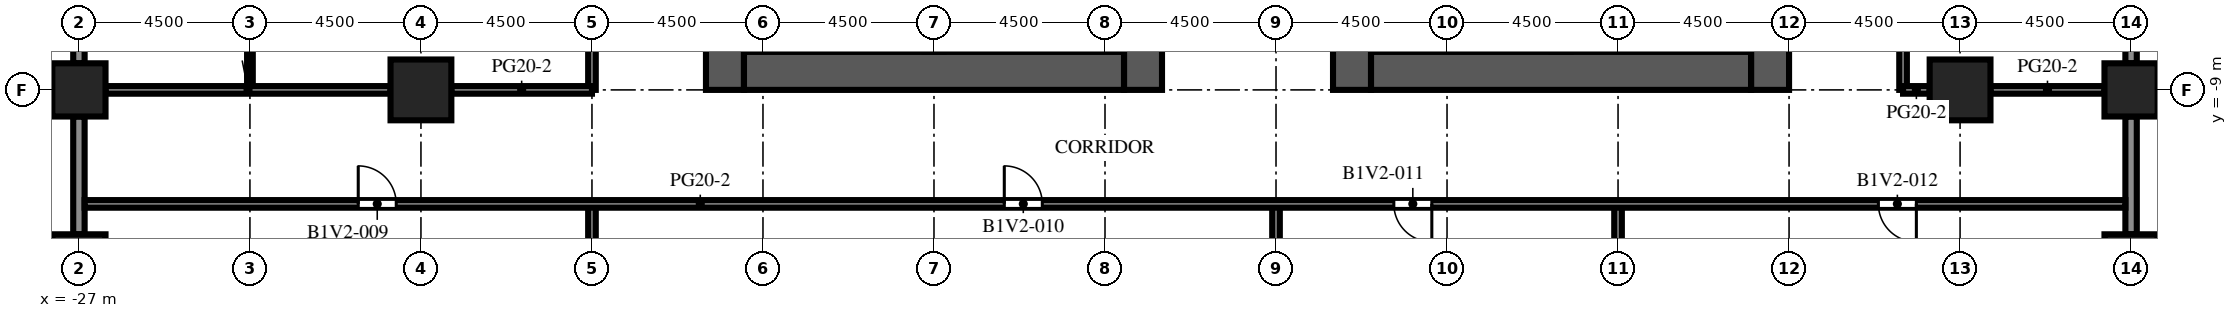
"""IFC4 building model, lengths in metres.
Left out: names, types, materials, properties, quantities, classifications, styles, units other than length and angle.
Written with IfcOpenShell. Run it as: python <this file> out.ifc"""

import sys

from ifc_helpers import new_model, si_unit, direction, frame, frame_2d, origin, origin_2d, place, context, subcontext, project, spatial, rectangle, extrude, element, fill, save


model = new_model("IFC4")
c1 = context("Model", 3, precision=1e-05, world=origin(), true_north=direction((0.0, 1.0)))
c2 = subcontext(c1, "Body", "Model", "MODEL_VIEW")
j1 = project(units=[si_unit("LENGTHUNIT", "METRE"), si_unit("PLANEANGLEUNIT", "RADIAN")], contexts=[c1])
p1 = place(None, origin())
s1 = spatial("IfcSite", under=j1, at=p1, CompositionType="ELEMENT")
p2 = place(p1, origin())
s2 = spatial("IfcBuilding", under=s1, at=p2, CompositionType="ELEMENT")
p3 = place(p2, frame((0.0, 0.0, 31.8)))
s3 = spatial("IfcBuildingStorey", under=s2, at=p3, CompositionType="ELEMENT", Elevation=31.8)
for number, where, z_axis, x_axis in (
    (1, (-27.0, -13.5, 0.0), (0.0, 0.0, 1.0), (1.0, 0.0, 0.0)),
    (2, (-27.0, -9.0, 0.0), (0.0, 0.0, 1.0), (1.0, 0.0, 0.0)),
    (3, (27.0, -13.5, 0.0), (0.0, 0.0, 1.0), (1.0, 0.0, 0.0)),
    (4, (27.0, -9.0, 0.0), (0.0, 0.0, 1.0), (1.0, 0.0, 0.0)),
):
    element("IfcColumn", number, at=place(p3, frame(where, z_axis=z_axis, x_axis=x_axis)), inside=s3, PredefinedType="COLUMN", context=c2, shape_type="SweptSolid", body=[
        extrude(rectangle(XDim=1.4, YDim=1.4, at=origin_2d()), origin(), (0.0, 0.0, 1.0), 4.1),
    ])
for number, where, z_axis, x_axis in (
    (5, (-18.0, -9.0, 0.0), (0.0, 0.0, 1.0), (1.0, 0.0, 0.0)),
    (6, (22.5, -9.0, 0.0), (0.0, 0.0, 1.0), (1.0, 0.0, 0.0)),
):
    element("IfcColumn", number, at=place(p3, frame(where, z_axis=z_axis, x_axis=x_axis)), inside=s3, PredefinedType="COLUMN", context=c2, shape_type="SweptSolid", body=[
        extrude(rectangle(XDim=1.6, YDim=1.6, at=origin_2d()), origin(), (0.0, 0.0, 1.0), 4.1),
    ])
p4 = place(p3, frame((-10.0, -9.0, 0.0), z_axis=(0.0, 0.0, 1.0), x_axis=(0.0, 1.0, 0.0)))
e7 = element("IfcWall", 7, at=p4, inside=s3, PredefinedType="SHEAR", context=c2, shape_type="SweptSolid", body=[
    extrude(rectangle(XDim=27.5, YDim=1.0, at=frame_2d((13.75, 0.0))), origin(), (0.0, 0.0, 1.0), 4.1),
])
p5 = place(p4, frame((12.55, 0.0, 0.0)))
e8 = element("IfcOpeningElement", 8, at=p5, cuts=e7, PredefinedType="OPENING", context=c2, shape_type="SweptSolid", body=[
    extrude(rectangle(XDim=2.4, YDim=2.4, at=frame_2d((1.2, 1.2))), frame((0.0, 0.51, 0.0), z_axis=(0.0, -1.0, 0.0), x_axis=(1.0, 0.0, 0.0)), (0.0, 0.0, 1.0), 1.02),
])
p6 = place(p4, frame((6.825, 0.0, 0.0)))
e9 = element("IfcOpeningElement", 9, at=p6, cuts=e7, PredefinedType="OPENING", context=c2, shape_type="SweptSolid", body=[
    extrude(rectangle(XDim=1.2, YDim=2.1, at=frame_2d((0.6, 1.05))), frame((0.0, 0.51, 0.0), z_axis=(0.0, -1.0, 0.0), x_axis=(1.0, 0.0, 0.0)), (0.0, 0.0, 1.0), 1.02),
])
p7 = place(p4, frame((19.475, 0.0, 0.0)))
e10 = element("IfcOpeningElement", 10, at=p7, cuts=e7, PredefinedType="OPENING", context=c2, shape_type="SweptSolid", body=[
    extrude(rectangle(XDim=1.2, YDim=2.1, at=frame_2d((0.6, 1.05))), frame((0.0, 0.51, 0.0), z_axis=(0.0, -1.0, 0.0), x_axis=(1.0, 0.0, 0.0)), (0.0, 0.0, 1.0), 1.02),
])
p8 = place(p3, frame((1.0, -9.0, 0.0), z_axis=(0.0, 0.0, 1.0), x_axis=(0.0, 1.0, 0.0)))
e11 = element("IfcWall", 11, at=p8, inside=s3, PredefinedType="SHEAR", context=c2, shape_type="SweptSolid", body=[
    extrude(rectangle(XDim=27.5, YDim=1.0, at=frame_2d((13.75, 0.0))), origin(), (0.0, 0.0, 1.0), 4.1),
])
p9 = place(p8, frame((12.55, 0.0, 0.0)))
e12 = element("IfcOpeningElement", 12, at=p9, cuts=e11, PredefinedType="OPENING", context=c2, shape_type="SweptSolid", body=[
    extrude(rectangle(XDim=2.4, YDim=2.4, at=frame_2d((1.2, 1.2))), frame((0.0, 0.51, 0.0), z_axis=(0.0, -1.0, 0.0), x_axis=(1.0, 0.0, 0.0)), (0.0, 0.0, 1.0), 1.02),
])
p10 = place(p8, frame((4.025, 0.0, 0.0)))
e13 = element("IfcOpeningElement", 13, at=p10, cuts=e11, PredefinedType="OPENING", context=c2, shape_type="SweptSolid", body=[
    extrude(rectangle(XDim=1.2, YDim=2.1, at=frame_2d((0.6, 1.05))), frame((0.0, 0.51, 0.0), z_axis=(0.0, -1.0, 0.0), x_axis=(1.0, 0.0, 0.0)), (0.0, 0.0, 1.0), 1.02),
])
p11 = place(p8, frame((19.475, 0.0, 0.0)))
e14 = element("IfcOpeningElement", 14, at=p11, cuts=e11, PredefinedType="OPENING", context=c2, shape_type="SweptSolid", body=[
    extrude(rectangle(XDim=1.0, YDim=2.1, at=frame_2d((0.5, 1.05))), frame((0.0, 0.51, 0.0), z_axis=(0.0, -1.0, 0.0), x_axis=(1.0, 0.0, 0.0)), (0.0, 0.0, 1.0), 1.02),
])
p12 = place(p8, frame((21.106, 0.0, 0.0)))
e15 = element("IfcOpeningElement", 15, at=p12, cuts=e11, PredefinedType="OPENING", context=c2, shape_type="SweptSolid", body=[
    extrude(rectangle(XDim=1.0, YDim=2.1, at=frame_2d((0.5, 1.05))), frame((0.0, 0.51, 0.0), z_axis=(0.0, -1.0, 0.0), x_axis=(1.0, 0.0, 0.0)), (0.0, 0.0, 1.0), 1.02),
])
p13 = place(p8, frame((23.1, 0.0, 0.0)))
e16 = element("IfcOpeningElement", 16, at=p13, cuts=e11, PredefinedType="OPENING", context=c2, shape_type="SweptSolid", body=[
    extrude(rectangle(XDim=1.0, YDim=2.1, at=frame_2d((0.5, 1.05))), frame((0.0, 0.51, 0.0), z_axis=(0.0, -1.0, 0.0), x_axis=(1.0, 0.0, 0.0)), (0.0, 0.0, 1.0), 1.02),
])
p14 = place(p8, frame((25.094, 0.0, 0.0)))
e17 = element("IfcOpeningElement", 17, at=p14, cuts=e11, PredefinedType="OPENING", context=c2, shape_type="SweptSolid", body=[
    extrude(rectangle(XDim=1.0, YDim=2.1, at=frame_2d((0.5, 1.05))), frame((0.0, 0.51, 0.0), z_axis=(0.0, -1.0, 0.0), x_axis=(1.0, 0.0, 0.0)), (0.0, 0.0, 1.0), 1.02),
])
p15 = place(p3, frame((-9.5, -8.5, 0.0), z_axis=(0.0, 0.0, 1.0), x_axis=(1.0, 0.0, 0.0)))
e18 = element("IfcWall", 18, at=p15, inside=s3, PredefinedType="SHEAR", context=c2, shape_type="SweptSolid", body=[
    extrude(rectangle(XDim=10.0, YDim=1.0, at=frame_2d((5.0, 0.0))), origin(), (0.0, 0.0, 1.0), 4.1),
])
p16 = place(p3, frame((6.5, -9.0, 0.0), z_axis=(0.0, 0.0, 1.0), x_axis=(0.0, 1.0, 0.0)))
e19 = element("IfcWall", 19, at=p16, inside=s3, PredefinedType="SHEAR", context=c2, shape_type="SweptSolid", body=[
    extrude(rectangle(XDim=27.5, YDim=1.0, at=frame_2d((13.75, 0.0))), origin(), (0.0, 0.0, 1.0), 4.1),
])
p17 = place(p16, frame((12.55, 0.0, 0.0)))
e20 = element("IfcOpeningElement", 20, at=p17, cuts=e19, PredefinedType="OPENING", context=c2, shape_type="SweptSolid", body=[
    extrude(rectangle(XDim=2.4, YDim=2.4, at=frame_2d((1.2, 1.2))), frame((0.0, 0.51, 0.0), z_axis=(0.0, -1.0, 0.0), x_axis=(1.0, 0.0, 0.0)), (0.0, 0.0, 1.0), 1.02),
])
p18 = place(p16, frame((4.025, 0.0, 0.0)))
e21 = element("IfcOpeningElement", 21, at=p18, cuts=e19, PredefinedType="OPENING", context=c2, shape_type="SweptSolid", body=[
    extrude(rectangle(XDim=1.2, YDim=2.1, at=frame_2d((0.6, 1.05))), frame((0.0, 0.51, 0.0), z_axis=(0.0, -1.0, 0.0), x_axis=(1.0, 0.0, 0.0)), (0.0, 0.0, 1.0), 1.02),
])
p19 = place(p16, frame((19.475, 0.0, 0.0)))
e22 = element("IfcOpeningElement", 22, at=p19, cuts=e19, PredefinedType="OPENING", context=c2, shape_type="SweptSolid", body=[
    extrude(rectangle(XDim=1.0, YDim=2.1, at=frame_2d((0.5, 1.05))), frame((0.0, 0.51, 0.0), z_axis=(0.0, -1.0, 0.0), x_axis=(1.0, 0.0, 0.0)), (0.0, 0.0, 1.0), 1.02),
])
p20 = place(p16, frame((21.106, 0.0, 0.0)))
e23 = element("IfcOpeningElement", 23, at=p20, cuts=e19, PredefinedType="OPENING", context=c2, shape_type="SweptSolid", body=[
    extrude(rectangle(XDim=1.0, YDim=2.1, at=frame_2d((0.5, 1.05))), frame((0.0, 0.51, 0.0), z_axis=(0.0, -1.0, 0.0), x_axis=(1.0, 0.0, 0.0)), (0.0, 0.0, 1.0), 1.02),
])
p21 = place(p16, frame((23.1, 0.0, 0.0)))
e24 = element("IfcOpeningElement", 24, at=p21, cuts=e19, PredefinedType="OPENING", context=c2, shape_type="SweptSolid", body=[
    extrude(rectangle(XDim=1.0, YDim=2.1, at=frame_2d((0.5, 1.05))), frame((0.0, 0.51, 0.0), z_axis=(0.0, -1.0, 0.0), x_axis=(1.0, 0.0, 0.0)), (0.0, 0.0, 1.0), 1.02),
])
p22 = place(p16, frame((25.094, 0.0, 0.0)))
e25 = element("IfcOpeningElement", 25, at=p22, cuts=e19, PredefinedType="OPENING", context=c2, shape_type="SweptSolid", body=[
    extrude(rectangle(XDim=1.0, YDim=2.1, at=frame_2d((0.5, 1.05))), frame((0.0, 0.51, 0.0), z_axis=(0.0, -1.0, 0.0), x_axis=(1.0, 0.0, 0.0)), (0.0, 0.0, 1.0), 1.02),
])
p23 = place(p3, frame((17.5, -9.0, 0.0), z_axis=(0.0, 0.0, 1.0), x_axis=(0.0, 1.0, 0.0)))
e26 = element("IfcWall", 26, at=p23, inside=s3, PredefinedType="SHEAR", context=c2, shape_type="SweptSolid", body=[
    extrude(rectangle(XDim=27.5, YDim=1.0, at=frame_2d((13.75, 0.0))), origin(), (0.0, 0.0, 1.0), 4.1),
])
p24 = place(p23, frame((12.55, 0.0, 0.0)))
e27 = element("IfcOpeningElement", 27, at=p24, cuts=e26, PredefinedType="OPENING", context=c2, shape_type="SweptSolid", body=[
    extrude(rectangle(XDim=2.4, YDim=2.4, at=frame_2d((1.2, 1.2))), frame((0.0, 0.51, 0.0), z_axis=(0.0, -1.0, 0.0), x_axis=(1.0, 0.0, 0.0)), (0.0, 0.0, 1.0), 1.02),
])
p25 = place(p23, frame((6.825, 0.0, 0.0)))
e28 = element("IfcOpeningElement", 28, at=p25, cuts=e26, PredefinedType="OPENING", context=c2, shape_type="SweptSolid", body=[
    extrude(rectangle(XDim=1.2, YDim=2.1, at=frame_2d((0.6, 1.05))), frame((0.0, 0.51, 0.0), z_axis=(0.0, -1.0, 0.0), x_axis=(1.0, 0.0, 0.0)), (0.0, 0.0, 1.0), 1.02),
])
p26 = place(p23, frame((19.475, 0.0, 0.0)))
e29 = element("IfcOpeningElement", 29, at=p26, cuts=e26, PredefinedType="OPENING", context=c2, shape_type="SweptSolid", body=[
    extrude(rectangle(XDim=1.2, YDim=2.1, at=frame_2d((0.6, 1.05))), frame((0.0, 0.51, 0.0), z_axis=(0.0, -1.0, 0.0), x_axis=(1.0, 0.0, 0.0)), (0.0, 0.0, 1.0), 1.02),
])
p27 = place(p3, frame((7.0, -8.5, 0.0), z_axis=(0.0, 0.0, 1.0), x_axis=(1.0, 0.0, 0.0)))
e30 = element("IfcWall", 30, at=p27, inside=s3, PredefinedType="SHEAR", context=c2, shape_type="SweptSolid", body=[
    extrude(rectangle(XDim=10.0, YDim=1.0, at=frame_2d((5.0, 0.0))), origin(), (0.0, 0.0, 1.0), 4.1),
])
for number, where, z_axis, x_axis in (
    (31, (27.0, -9.7, 0.0), (0.0, 0.0, 1.0), (0.0, -1.0, 0.0)),
    (32, (27.0, -5.2, 0.0), (0.0, 0.0, 1.0), (0.0, -1.0, 0.0)),
    (33, (-27.0, -8.3, 0.0), (0.0, 0.0, 1.0), (0.0, 1.0, 0.0)),
    (34, (-27.0, -12.8, 0.0), (0.0, 0.0, 1.0), (0.0, 1.0, 0.0)),
):
    element("IfcWall", number, at=place(p3, frame(where, z_axis=z_axis, x_axis=x_axis)), inside=s3, PredefinedType="SOLIDWALL", context=c2, shape_type="SweptSolid", body=[
        extrude(rectangle(XDim=3.1, YDim=0.3, at=frame_2d((1.55, 0.0))), origin(), (0.0, 0.0, 1.0), 2.6),
    ])
p28 = place(p3, frame((-22.5, -9.0, 0.0), z_axis=(0.0, 0.0, 1.0), x_axis=(0.0, 1.0, 0.0)))
e35 = element("IfcWall", 35, at=p28, inside=s3, PredefinedType="PARTITIONING", context=c2, shape_type="SweptSolid", body=[
    extrude(rectangle(XDim=27.5, YDim=0.15, at=frame_2d((13.75, 0.0))), origin(), (0.0, 0.0, 1.0), 3.5),
])
p29 = place(p28, frame((7.85, 0.0, 0.0)))
e36 = element("IfcOpeningElement", 36, at=p29, cuts=e35, PredefinedType="OPENING", context=c2, shape_type="SweptSolid", body=[
    extrude(rectangle(XDim=1.0, YDim=2.1, at=frame_2d((0.5, 1.05))), frame((0.0, 0.085, 0.0), z_axis=(0.0, -1.0, 0.0), x_axis=(1.0, 0.0, 0.0)), (0.0, 0.0, 1.0), 0.17),
])
p30 = place(p28, frame((18.85, 0.0, 0.0)))
e37 = element("IfcOpeningElement", 37, at=p30, cuts=e35, PredefinedType="OPENING", context=c2, shape_type="SweptSolid", body=[
    extrude(rectangle(XDim=1.0, YDim=2.1, at=frame_2d((0.5, 1.05))), frame((0.0, 0.085, 0.0), z_axis=(0.0, -1.0, 0.0), x_axis=(1.0, 0.0, 0.0)), (0.0, 0.0, 1.0), 0.17),
])
p31 = place(p3, frame((-13.5, -26.3, 0.0), z_axis=(0.0, 0.0, 1.0), x_axis=(0.0, 1.0, 0.0)))
e38 = element("IfcWall", 38, at=p31, inside=s3, PredefinedType="PARTITIONING", context=c2, shape_type="SweptSolid", body=[
    extrude(rectangle(XDim=14.3, YDim=0.2, at=frame_2d((7.15, 0.0))), origin(), (0.0, 0.0, 1.0), 3.5),
])
p32 = place(p3, frame((-13.5, -9.0, 0.0), z_axis=(0.0, 0.0, 1.0), x_axis=(0.0, 1.0, 0.0)))
e39 = element("IfcWall", 39, at=p32, inside=s3, PredefinedType="PARTITIONING", context=c2, shape_type="SweptSolid", body=[
    extrude(rectangle(XDim=27.5, YDim=0.2, at=frame_2d((13.75, 0.0))), origin(), (0.0, 0.0, 1.0), 3.5),
])
p33 = place(p32, frame((8.1, 0.0, 0.0)))
e40 = element("IfcOpeningElement", 40, at=p33, cuts=e39, PredefinedType="OPENING", context=c2, shape_type="SweptSolid", body=[
    extrude(rectangle(XDim=1.0, YDim=2.1, at=frame_2d((0.5, 1.05))), frame((0.0, 0.11, 0.0), z_axis=(0.0, -1.0, 0.0), x_axis=(1.0, 0.0, 0.0)), (0.0, 0.0, 1.0), 0.22),
])
p34 = place(p32, frame((20.6, 0.0, 0.0)))
e41 = element("IfcOpeningElement", 41, at=p34, cuts=e39, PredefinedType="OPENING", context=c2, shape_type="SweptSolid", body=[
    extrude(rectangle(XDim=1.0, YDim=2.1, at=frame_2d((0.5, 1.05))), frame((0.0, 0.11, 0.0), z_axis=(0.0, -1.0, 0.0), x_axis=(1.0, 0.0, 0.0)), (0.0, 0.0, 1.0), 0.22),
])
for number, where, z_axis, x_axis in (
    (42, (4.5, -26.3, 0.0), (0.0, 0.0, 1.0), (0.0, 1.0, 0.0)),
    (43, (13.5, -26.3, 0.0), (0.0, 0.0, 1.0), (0.0, 1.0, 0.0)),
):
    element("IfcWall", number, at=place(p3, frame(where, z_axis=z_axis, x_axis=x_axis)), inside=s3, PredefinedType="PARTITIONING", context=c2, shape_type="SweptSolid", body=[
        extrude(rectangle(XDim=14.3, YDim=0.2, at=frame_2d((7.15, 0.0))), origin(), (0.0, 0.0, 1.0), 3.5),
    ])
p35 = place(p3, frame((21.0, 18.5, 0.0), z_axis=(0.0, 0.0, 1.0), x_axis=(0.0, -1.0, 0.0)))
e44 = element("IfcWall", 44, at=p35, inside=s3, PredefinedType="PARTITIONING", context=c2, shape_type="SweptSolid", body=[
    extrude(rectangle(XDim=27.5, YDim=0.2, at=frame_2d((13.75, 0.0))), origin(), (0.0, 0.0, 1.0), 3.5),
])
p36 = place(p35, frame((21.15, 0.0, 0.0)))
e45 = element("IfcOpeningElement", 45, at=p36, cuts=e44, PredefinedType="OPENING", context=c2, shape_type="SweptSolid", body=[
    extrude(rectangle(XDim=1.0, YDim=2.1, at=frame_2d((0.5, 1.05))), frame((0.0, 0.11, 0.0), z_axis=(0.0, -1.0, 0.0), x_axis=(1.0, 0.0, 0.0)), (0.0, 0.0, 1.0), 0.22),
])
p37 = place(p35, frame((7.65, 0.0, 0.0)))
e46 = element("IfcOpeningElement", 46, at=p37, cuts=e44, PredefinedType="OPENING", context=c2, shape_type="SweptSolid", body=[
    extrude(rectangle(XDim=1.0, YDim=2.1, at=frame_2d((0.5, 1.05))), frame((0.0, 0.11, 0.0), z_axis=(0.0, -1.0, 0.0), x_axis=(1.0, 0.0, 0.0)), (0.0, 0.0, 1.0), 0.22),
])
p38 = place(p3, frame((26.85, -12.0, 0.0), z_axis=(0.0, 0.0, 1.0), x_axis=(-1.0, 0.0, 0.0)))
e47 = element("IfcWall", 47, at=p38, inside=s3, PredefinedType="PARTITIONING", context=c2, shape_type="SweptSolid", body=[
    extrude(rectangle(XDim=53.7, YDim=0.2, at=frame_2d((26.85, 0.0))), origin(), (0.0, 0.0, 1.0), 3.5),
])
p39 = place(p38, frame((45.5, 0.0, 0.0)))
e48 = element("IfcOpeningElement", 48, at=p39, cuts=e47, PredefinedType="OPENING", context=c2, shape_type="SweptSolid", body=[
    extrude(rectangle(XDim=1.0, YDim=2.1, at=frame_2d((0.5, 1.05))), frame((0.0, 0.11, 0.0), z_axis=(0.0, -1.0, 0.0), x_axis=(1.0, 0.0, 0.0)), (0.0, 0.0, 1.0), 0.22),
])
p40 = place(p38, frame((28.5, 0.0, 0.0)))
e49 = element("IfcOpeningElement", 49, at=p40, cuts=e47, PredefinedType="OPENING", context=c2, shape_type="SweptSolid", body=[
    extrude(rectangle(XDim=1.0, YDim=2.1, at=frame_2d((0.5, 1.05))), frame((0.0, 0.11, 0.0), z_axis=(0.0, -1.0, 0.0), x_axis=(1.0, 0.0, 0.0)), (0.0, 0.0, 1.0), 0.22),
])
p41 = place(p38, frame((18.25, 0.0, 0.0)))
e50 = element("IfcOpeningElement", 50, at=p41, cuts=e47, PredefinedType="OPENING", context=c2, shape_type="SweptSolid", body=[
    extrude(rectangle(XDim=1.0, YDim=2.1, at=frame_2d((0.5, 1.05))), frame((0.0, 0.11, 0.0), z_axis=(0.0, -1.0, 0.0), x_axis=(1.0, 0.0, 0.0)), (0.0, 0.0, 1.0), 0.22),
])
p42 = place(p38, frame((5.5, 0.0, 0.0)))
e51 = element("IfcOpeningElement", 51, at=p42, cuts=e47, PredefinedType="OPENING", context=c2, shape_type="SweptSolid", body=[
    extrude(rectangle(XDim=1.0, YDim=2.1, at=frame_2d((0.5, 1.05))), frame((0.0, 0.11, 0.0), z_axis=(0.0, -1.0, 0.0), x_axis=(1.0, 0.0, 0.0)), (0.0, 0.0, 1.0), 0.22),
])
p43 = place(p3, frame((-26.3, -9.0, 0.0), z_axis=(0.0, 0.0, 1.0), x_axis=(1.0, 0.0, 0.0)))
e52 = element("IfcWall", 52, at=p43, inside=s3, PredefinedType="PARTITIONING", context=c2, shape_type="SweptSolid", body=[
    extrude(rectangle(XDim=7.5, YDim=0.2, at=frame_2d((3.75, 0.0))), origin(), (0.0, 0.0, 1.0), 3.5),
])
p44 = place(p3, frame((-17.2, -9.0, 0.0), z_axis=(0.0, 0.0, 1.0), x_axis=(1.0, 0.0, 0.0)))
e53 = element("IfcWall", 53, at=p44, inside=s3, PredefinedType="PARTITIONING", context=c2, shape_type="SweptSolid", body=[
    extrude(rectangle(XDim=3.7, YDim=0.2, at=frame_2d((1.85, 0.0))), origin(), (0.0, 0.0, 1.0), 3.5),
])
p45 = place(p3, frame((21.0, -9.0, 0.0), z_axis=(0.0, 0.0, 1.0), x_axis=(1.0, 0.0, 0.0)))
e54 = element("IfcWall", 54, at=p45, inside=s3, PredefinedType="PARTITIONING", context=c2, shape_type="SweptSolid", body=[
    extrude(rectangle(XDim=0.7, YDim=0.2, at=frame_2d((0.35, 0.0))), origin(), (0.0, 0.0, 1.0), 3.5),
])
p46 = place(p3, frame((23.3, -9.0, 0.0), z_axis=(0.0, 0.0, 1.0), x_axis=(1.0, 0.0, 0.0)))
e55 = element("IfcWall", 55, at=p46, inside=s3, PredefinedType="PARTITIONING", context=c2, shape_type="SweptSolid", body=[
    extrude(rectangle(XDim=3.0, YDim=0.2, at=frame_2d((1.5, 0.0))), origin(), (0.0, 0.0, 1.0), 3.5),
])
p47 = place(p39, origin())
e56 = element("IfcDoor", 56, at=p47, inside=s3, OperationType="SINGLE_SWING_RIGHT", PredefinedType="DOOR", context=c2, shape_type="SweptSolid", body=[
    extrude(rectangle(XDim=1.0, YDim=2.1, at=frame_2d((0.5, 1.05))), frame((0.0, 0.025, 0.0), z_axis=(0.0, -1.0, 0.0), x_axis=(1.0, 0.0, 0.0)), (0.0, 0.0, 1.0), 0.05),
])
fill(e48, e56)
p48 = place(p40, origin())
e57 = element("IfcDoor", 57, at=p48, inside=s3, OperationType="SINGLE_SWING_RIGHT", PredefinedType="DOOR", context=c2, shape_type="SweptSolid", body=[
    extrude(rectangle(XDim=1.0, YDim=2.1, at=frame_2d((0.5, 1.05))), frame((0.0, 0.025, 0.0), z_axis=(0.0, -1.0, 0.0), x_axis=(1.0, 0.0, 0.0)), (0.0, 0.0, 1.0), 0.05),
])
fill(e49, e57)
p49 = place(p41, origin())
e58 = element("IfcDoor", 58, at=p49, inside=s3, OperationType="SINGLE_SWING_LEFT", PredefinedType="DOOR", context=c2, shape_type="SweptSolid", body=[
    extrude(rectangle(XDim=1.0, YDim=2.1, at=frame_2d((0.5, 1.05))), frame((0.0, 0.025, 0.0), z_axis=(0.0, -1.0, 0.0), x_axis=(1.0, 0.0, 0.0)), (0.0, 0.0, 1.0), 0.05),
])
fill(e50, e58)
p50 = place(p42, origin())
e59 = element("IfcDoor", 59, at=p50, inside=s3, OperationType="SINGLE_SWING_LEFT", PredefinedType="DOOR", context=c2, shape_type="SweptSolid", body=[
    extrude(rectangle(XDim=1.0, YDim=2.1, at=frame_2d((0.5, 1.05))), frame((0.0, 0.025, 0.0), z_axis=(0.0, -1.0, 0.0), x_axis=(1.0, 0.0, 0.0)), (0.0, 0.0, 1.0), 0.05),
])
fill(e51, e59)
save(model, sys.argv[1])
